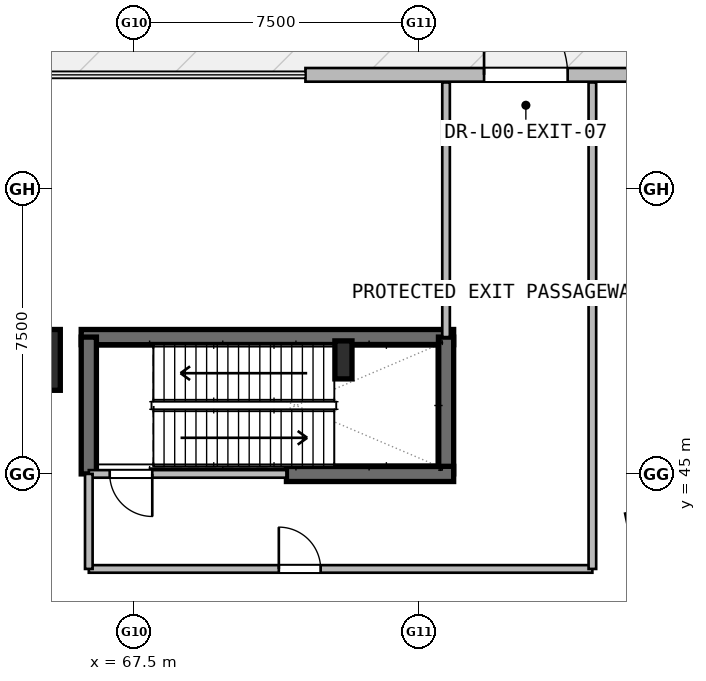
"""IFC4 building model, lengths in metres.
Left out: names, types, materials, properties, quantities, classifications, styles, units other than length and angle.
Written with IfcOpenShell. Run it as: python <this file> out.ifc"""

import sys

from ifc_helpers import new_model, si_unit, direction, frame, frame_2d, origin, origin_2d, place, context, subcontext, project, spatial, rectangle, hollow_rectangle, i_section, extrude, element, fill, save


model = new_model("IFC4")
c1 = context("Model", 3, precision=1e-05, world=origin(), true_north=direction((0.0, 1.0)))
c2 = subcontext(c1, "Body", "Model", "MODEL_VIEW")
j1 = project(units=[si_unit("LENGTHUNIT", "METRE"), si_unit("PLANEANGLEUNIT", "RADIAN")], contexts=[c1])
p1 = place(None, origin())
s1 = spatial("IfcSite", under=j1, at=p1, CompositionType="ELEMENT")
p2 = place(p1, origin())
s2 = spatial("IfcBuilding", under=s1, at=p2, CompositionType="ELEMENT")
p3 = place(p2, origin())
s3 = spatial("IfcBuildingStorey", under=s2, at=p3, CompositionType="ELEMENT", Elevation=0.0)
p4 = place(p3, frame((64.75, 48.0, 0.0), z_axis=(0.0, 0.0, 1.0), x_axis=(1.0, 0.0, 0.0)))
e1 = element("IfcColumn", 1, at=p4, inside=s3, PredefinedType="COLUMN", context=c2, shape_type="SweptSolid", body=[
    extrude(hollow_rectangle(XDim=1.6, YDim=1.6, WallThickness=0.04, at=origin_2d()), origin(), (0.0, 0.0, 1.0), 6.0),
])
p5 = place(p3, frame((73.0, 48.0, 0.0), z_axis=(0.0, 0.0, 1.0), x_axis=(1.0, 0.0, 0.0)))
e2 = element("IfcColumn", 2, at=p5, inside=s3, PredefinedType="COLUMN", context=c2, shape_type="SweptSolid", body=[
    extrude(i_section(OverallWidth=0.45, OverallDepth=1.0, WebThickness=0.022, FlangeThickness=0.04, at=origin_2d()), origin(), (0.0, 0.0, 1.0), 6.0),
])
p6 = place(p3, frame((66.1, 48.6, 0.0), z_axis=(0.0, 0.0, 1.0), x_axis=(1.0, 0.0, 0.0)))
e3 = element("IfcWall", 3, at=p6, inside=s3, PredefinedType="SHEAR", context=c2, shape_type="SweptSolid", body=[
    extrude(rectangle(XDim=9.8, YDim=0.4, at=frame_2d((4.9, 0.0))), origin(), (0.0, 0.0, 1.0), 6.0),
])
for number, where, z_axis, x_axis in (
    (4, (66.3, 45.0, 0.0), (0.0, 0.0, 1.0), (0.0, 1.0, 0.0)),
    (5, (75.7, 45.0, 0.0), (0.0, 0.0, 1.0), (0.0, 1.0, 0.0)),
):
    element("IfcWall", number, at=place(p3, frame(where, z_axis=z_axis, x_axis=x_axis)), inside=s3, PredefinedType="SHEAR", context=c2, shape_type="SweptSolid", body=[
        extrude(rectangle(XDim=3.6, YDim=0.4, at=frame_2d((1.8, 0.0))), origin(), (0.0, 0.0, 1.0), 6.0),
    ])
p7 = place(p3, frame((71.5, 45.0, 0.0), z_axis=(0.0, 0.0, 1.0), x_axis=(1.0, 0.0, 0.0)))
e6 = element("IfcWall", 6, at=p7, inside=s3, PredefinedType="SHEAR", context=c2, shape_type="SweptSolid", body=[
    extrude(rectangle(XDim=4.4, YDim=0.4, at=frame_2d((2.2, 0.0))), origin(), (0.0, 0.0, 1.0), 6.0),
])
p8 = place(p3, frame((72.0, 55.5, 0.0), z_axis=(0.0, 0.0, 1.0), x_axis=(1.0, 0.0, 0.0)))
e7 = element("IfcWall", 7, at=p8, inside=s3, PredefinedType="SOLIDWALL", context=c2, shape_type="SweptSolid", body=[
    extrude(rectangle(XDim=24.0, YDim=0.36, at=frame_2d((12.0, 0.0))), origin(), (0.0, 0.0, 1.0), 5.68),
])
p9 = place(p8, frame((4.7, 0.0, 0.0)))
e8 = element("IfcOpeningElement", 8, at=p9, cuts=e7, PredefinedType="OPENING", context=c2, shape_type="SweptSolid", body=[
    extrude(rectangle(XDim=2.2, YDim=2.4, at=frame_2d((1.1, 1.2))), frame((0.0, 0.19, 0.0), z_axis=(0.0, -1.0, 0.0), x_axis=(1.0, 0.0, 0.0)), (0.0, 0.0, 1.0), 0.38),
])
p10 = place(p8, frame((15.0, 0.0, 0.0)))
e9 = element("IfcOpeningElement", 9, at=p10, cuts=e7, PredefinedType="OPENING", context=c2, shape_type="SweptSolid", body=[
    extrude(rectangle(XDim=2.2, YDim=2.4, at=frame_2d((1.1, 1.2))), frame((0.0, 0.19, 0.0), z_axis=(0.0, -1.0, 0.0), x_axis=(1.0, 0.0, 0.0)), (0.0, 0.0, 1.0), 0.38),
])
p11 = place(p3, frame((71.5, 45.0, 0.0), z_axis=(0.0, 0.0, 1.0), x_axis=(-1.0, 0.0, 0.0)))
e10 = element("IfcWall", 10, at=p11, inside=s3, PredefinedType="PARTITIONING", context=c2, shape_type="SweptSolid", body=[
    extrude(rectangle(XDim=5.2, YDim=0.2, at=frame_2d((2.6, 0.0))), origin(), (0.0, 0.0, 1.0), 5.68),
])
p12 = place(p11, frame((3.53, 0.0, 0.0)))
e11 = element("IfcOpeningElement", 11, at=p12, cuts=e10, PredefinedType="OPENING", context=c2, shape_type="SweptSolid", body=[
    extrude(rectangle(XDim=1.12, YDim=2.1, at=frame_2d((0.56, 1.05))), frame((0.0, 0.11, 0.0), z_axis=(0.0, -1.0, 0.0), x_axis=(1.0, 0.0, 0.0)), (0.0, 0.0, 1.0), 0.22),
])
p13 = place(p3, frame((66.3, 42.5, 0.0), z_axis=(0.0, 0.0, 1.0), x_axis=(1.0, 0.0, 0.0)))
e12 = element("IfcWall", 12, at=p13, inside=s3, PredefinedType="PARTITIONING", context=c2, shape_type="SweptSolid", body=[
    extrude(rectangle(XDim=13.25, YDim=0.2, at=frame_2d((6.625, 0.0))), origin(), (0.0, 0.0, 1.0), 5.68),
])
p14 = place(p13, frame((5.0, 0.0, 0.0)))
e13 = element("IfcOpeningElement", 13, at=p14, cuts=e12, PredefinedType="OPENING", context=c2, shape_type="SweptSolid", body=[
    extrude(rectangle(XDim=1.1, YDim=2.15, at=frame_2d((0.55, 1.075))), frame((0.0, 0.11, 0.0), z_axis=(0.0, -1.0, 0.0), x_axis=(1.0, 0.0, 0.0)), (0.0, 0.0, 1.0), 0.22),
])
p15 = place(p3, frame((66.3, 42.5, 0.0), z_axis=(0.0, 0.0, 1.0), x_axis=(0.0, 1.0, 0.0)))
e14 = element("IfcWall", 14, at=p15, inside=s3, PredefinedType="PARTITIONING", context=c2, shape_type="SweptSolid", body=[
    extrude(rectangle(XDim=2.5, YDim=0.2, at=frame_2d((1.25, 0.0))), origin(), (0.0, 0.0, 1.0), 5.68),
])
p16 = place(p3, frame((79.55, 42.5, 0.0), z_axis=(0.0, 0.0, 1.0), x_axis=(0.0, 1.0, 0.0)))
e15 = element("IfcWall", 15, at=p16, inside=s3, PredefinedType="PARTITIONING", context=c2, shape_type="SweptSolid", body=[
    extrude(rectangle(XDim=12.8, YDim=0.2, at=frame_2d((6.4, 0.0))), origin(), (0.0, 0.0, 1.0), 5.68),
])
p17 = place(p3, frame((75.7, 48.6, 0.0), z_axis=(0.0, 0.0, 1.0), x_axis=(0.0, 1.0, 0.0)))
e16 = element("IfcWall", 16, at=p17, inside=s3, PredefinedType="PARTITIONING", context=c2, shape_type="SweptSolid", body=[
    extrude(rectangle(XDim=6.7, YDim=0.2, at=frame_2d((3.35, 0.0))), origin(), (0.0, 0.0, 1.0), 5.68),
])
p18 = place(p9, origin())
e17 = element("IfcDoor", 17, at=p18, inside=s3, OperationType="DOUBLE_DOOR_SINGLE_SWING", PredefinedType="DOOR", context=c2, shape_type="SweptSolid", body=[
    extrude(rectangle(XDim=2.2, YDim=2.4, at=frame_2d((1.1, 1.2))), frame((0.0, 0.025, 0.0), z_axis=(0.0, -1.0, 0.0), x_axis=(1.0, 0.0, 0.0)), (0.0, 0.0, 1.0), 0.05),
])
fill(e8, e17)
p19 = place(p12, origin())
e18 = element("IfcDoor", 18, at=p19, inside=s3, OperationType="SINGLE_SWING_RIGHT", PredefinedType="DOOR", context=c2, shape_type="SweptSolid", body=[
    extrude(rectangle(XDim=1.12, YDim=2.1, at=frame_2d((0.56, 1.05))), frame((0.0, 0.025, 0.0), z_axis=(0.0, -1.0, 0.0), x_axis=(1.0, 0.0, 0.0)), (0.0, 0.0, 1.0), 0.05),
])
fill(e11, e18)
p20 = place(p14, origin())
e19 = element("IfcDoor", 19, at=p20, inside=s3, OperationType="SINGLE_SWING_LEFT", PredefinedType="DOOR", context=c2, shape_type="SweptSolid", body=[
    extrude(rectangle(XDim=1.1, YDim=2.15, at=frame_2d((0.55, 1.075))), frame((0.0, 0.025, 0.0), z_axis=(0.0, -1.0, 0.0), x_axis=(1.0, 0.0, 0.0)), (0.0, 0.0, 1.0), 0.05),
])
fill(e13, e19)
save(model, sys.argv[1])
